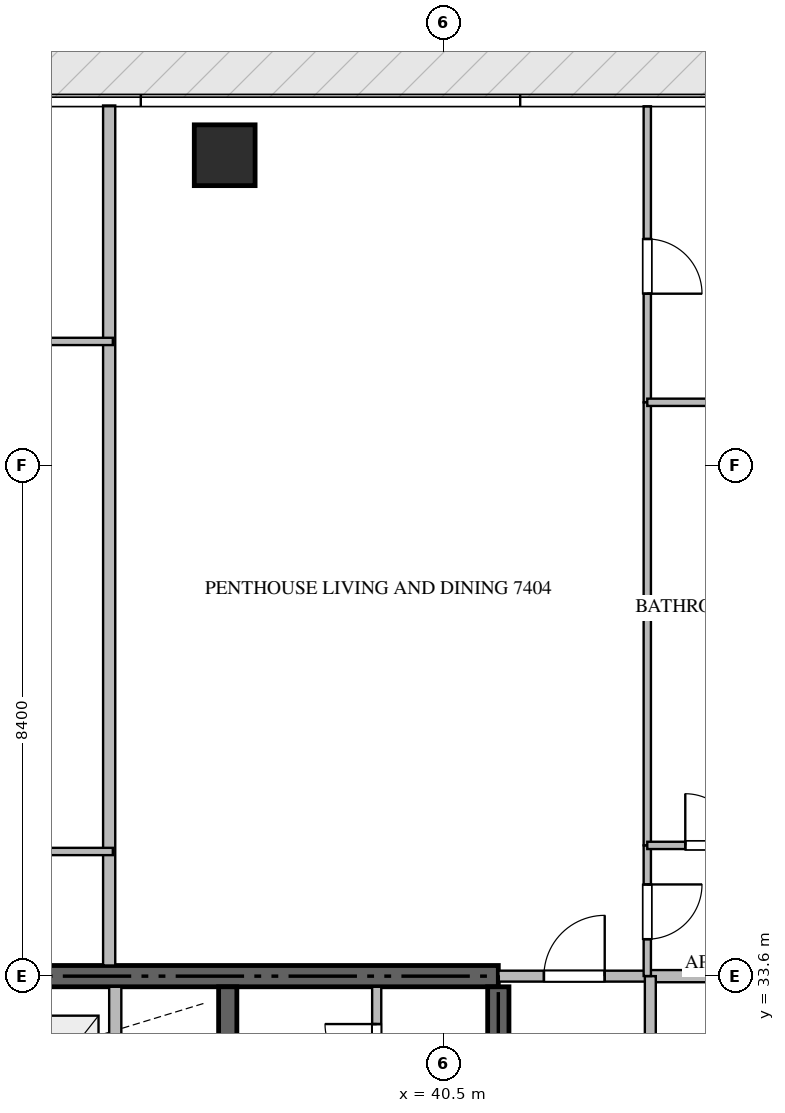
"""IFC4 building model, lengths in metres.
Left out: names, types, materials, properties, quantities, classifications, styles, units other than length and angle.
Written with IfcOpenShell. Run it as: python <this file> out.ifc"""

import sys

from ifc_helpers import new_model, si_unit, direction, frame, frame_2d, origin, origin_2d, place, context, subcontext, project, spatial, rectangle, extrude, source, transform, mapped, element, fill, save


model = new_model("IFC4")
c1 = context("Model", 3, precision=1e-05, world=origin(), true_north=direction((0.0, 1.0)))
c2 = subcontext(c1, "Body", "Model", "MODEL_VIEW")
j1 = project(units=[si_unit("LENGTHUNIT", "METRE"), si_unit("PLANEANGLEUNIT", "RADIAN")], contexts=[c1])
p1 = place(None, origin())
s1 = spatial("IfcSite", under=j1, at=p1, CompositionType="ELEMENT")
p2 = place(p1, origin())
s2 = spatial("IfcBuilding", under=s1, at=p2, CompositionType="ELEMENT")
p3 = place(p2, frame((0.0, 0.0, 297.5)))
s3 = spatial("IfcBuildingStorey", under=s2, at=p3, CompositionType="ELEMENT", Elevation=297.5)
p4 = place(p3, frame((41.4, 33.6, -0.26), z_axis=(0.0, 0.0, 1.0), x_axis=(-1.0, 0.0, 0.0)))
e1 = element("IfcWall", 1, at=p4, inside=s3, PredefinedType="SHEAR", context=c2, shape_type="SweptSolid", body=[
    extrude(rectangle(XDim=18.0, YDim=0.35, at=frame_2d((9.0, 0.0))), origin(), (0.0, 0.0, 1.0), 4.048),
])
p5 = place(p3, frame((41.4, 27.75, -0.26), z_axis=(0.0, 0.0, 1.0), x_axis=(0.0, 1.0, 0.0)))
e2 = element("IfcWall", 2, at=p5, inside=s3, PredefinedType="SHEAR", context=c2, shape_type="SweptSolid", body=[
    extrude(rectangle(XDim=5.675, YDim=0.35, at=frame_2d((2.837, 0.0))), origin(), (0.0, 0.0, 1.0), 4.048),
])
p6 = place(p3, frame((36.95, 27.05, -0.26), z_axis=(0.0, 0.0, 1.0), x_axis=(0.0, 1.0, 0.0)))
e3 = element("IfcWall", 3, at=p6, inside=s3, PredefinedType="SHEAR", context=c2, shape_type="SweptSolid", body=[
    extrude(rectangle(XDim=6.375, YDim=0.3, at=frame_2d((3.188, 0.0))), origin(), (0.0, 0.0, 1.0), 4.048),
])
m1 = source(origin(), c2, "Body", "SweptSolid", [
    extrude(rectangle(XDim=1.0, YDim=1.0, at=origin_2d()), origin(), (0.0, 0.0, 1.0), 4.05),
])
p7 = place(p3, frame((36.9, 47.1, -0.26), z_axis=(0.0, 0.0, 1.0), x_axis=(1.0, 0.0, 0.0)))
e4 = element("IfcColumn", 4, at=p7, inside=s3, PredefinedType="COLUMN", context=c2, shape_type="MappedRepresentation", body=[
    mapped(m1, transform((0.0, 0.0, 0.0), scale=1.0)),
])
p8 = place(p3, frame((35.1, 30.75, 0.0), z_axis=(0.0, 0.0, 1.0), x_axis=(0.0, 1.0, 0.0)))
e5 = element("IfcWall", 5, at=p8, inside=s3, PredefinedType="STANDARD", context=c2, shape_type="SweptSolid", body=[
    extrude(rectangle(XDim=2.675, YDim=0.2, at=frame_2d((1.337, 0.0))), origin(), (0.0, 0.0, 1.0), 3.79),
])
p9 = place(p3, frame((39.4, 31.35, 0.0), z_axis=(0.0, 0.0, 1.0), x_axis=(0.0, 1.0, 0.0)))
e6 = element("IfcWall", 6, at=p9, inside=s3, PredefinedType="PARTITIONING", context=c2, shape_type="SweptSolid", body=[
    extrude(rectangle(XDim=2.075, YDim=0.15, at=frame_2d((1.038, 0.0))), origin(), (0.0, 0.0, 1.0), 3.79),
])
p10 = place(p9, frame((0.612, 0.0, 0.0)))
e7 = element("IfcOpeningElement", 7, at=p10, cuts=e6, PredefinedType="OPENING", context=c2, shape_type="SweptSolid", body=[
    extrude(rectangle(XDim=0.85, YDim=2.1, at=frame_2d((0.425, 1.05))), frame((0.0, 0.085, 0.0), z_axis=(0.0, -1.0, 0.0), x_axis=(1.0, 0.0, 0.0)), (0.0, 0.0, 1.0), 0.17),
])
p11 = place(p3, frame((35.0, 33.775, 0.0), z_axis=(0.0, 0.0, 1.0), x_axis=(0.0, 1.0, 0.0)))
e8 = element("IfcWall", 8, at=p11, inside=s3, PredefinedType="PARTITIONING", context=c2, shape_type="SweptSolid", body=[
    extrude(rectangle(XDim=14.143, YDim=0.2, at=frame_2d((7.072, 0.0))), origin(), (0.0, 0.0, 1.0), 3.79),
])
p12 = place(p3, frame((43.9, 33.6, 0.0), z_axis=(0.0, 0.0, 1.0), x_axis=(1.0, 0.0, 0.0)))
e9 = element("IfcWall", 9, at=p12, inside=s3, PredefinedType="PARTITIONING", context=c2, shape_type="SweptSolid", body=[
    extrude(rectangle(XDim=11.618, YDim=0.2, at=frame_2d((5.809, 0.0))), origin(), (0.0, 0.0, 1.0), 3.79),
])
p13 = place(p3, frame((41.402, 33.6, 0.0), z_axis=(0.0, 0.0, 1.0), x_axis=(1.0, 0.0, 0.0)))
e10 = element("IfcWall", 10, at=p13, inside=s3, PredefinedType="PARTITIONING", context=c2, shape_type="SweptSolid", body=[
    extrude(rectangle(XDim=2.496, YDim=0.18, at=frame_2d((1.248, 0.0))), origin(), (0.0, 0.0, 1.0), 3.79),
])
p14 = place(p13, frame((0.748, 0.0, 0.0)))
e11 = element("IfcOpeningElement", 11, at=p14, cuts=e10, PredefinedType="OPENING", context=c2, shape_type="SweptSolid", body=[
    extrude(rectangle(XDim=1.0, YDim=2.15, at=frame_2d((0.5, 1.075))), frame((0.0, 0.1, 0.0), z_axis=(0.0, -1.0, 0.0), x_axis=(1.0, 0.0, 0.0)), (0.0, 0.0, 1.0), 0.2),
])
p15 = place(p3, frame((43.9, 16.8, 0.0), z_axis=(0.0, 0.0, 1.0), x_axis=(0.0, 1.0, 0.0)))
e12 = element("IfcWall", 12, at=p15, inside=s3, PredefinedType="PARTITIONING", context=c2, shape_type="SweptSolid", body=[
    extrude(rectangle(XDim=16.8, YDim=0.18, at=frame_2d((8.4, 0.0))), origin(), (0.0, 0.0, 1.0), 3.79),
])
p16 = place(p15, frame((1.3, 0.0, 0.0)))
e13 = element("IfcOpeningElement", 13, at=p16, cuts=e12, PredefinedType="OPENING", context=c2, shape_type="SweptSolid", body=[
    extrude(rectangle(XDim=1.0, YDim=2.15, at=frame_2d((0.5, 1.075))), frame((0.0, 0.1, 0.0), z_axis=(0.0, -1.0, 0.0), x_axis=(1.0, 0.0, 0.0)), (0.0, 0.0, 1.0), 0.2),
])
for number, where, z_axis, x_axis in (
    (14, (26.3, 44.038, 0.0), (0.0, 0.0, 1.0), (1.0, 0.0, 0.0)),
    (15, (26.3, 35.65, 0.0), (0.0, 0.0, 1.0), (1.0, 0.0, 0.0)),
):
    element("IfcWall", number, at=place(p3, frame(where, z_axis=z_axis, x_axis=x_axis)), inside=s3, PredefinedType="PARTITIONING", context=c2, shape_type="SweptSolid", body=[
        extrude(rectangle(XDim=8.76, YDim=0.12, at=frame_2d((4.38, 0.0))), origin(), (0.0, 0.0, 1.0), 3.79),
    ])
p17 = place(p3, frame((43.85, 35.75, 0.0), z_axis=(0.0, 0.0, 1.0), x_axis=(0.0, -1.0, 0.0)))
e16 = element("IfcWall", 16, at=p17, inside=s3, PredefinedType="PARTITIONING", context=c2, shape_type="SweptSolid", body=[
    extrude(rectangle(XDim=2.148, YDim=0.12, at=frame_2d((1.074, 0.0))), origin(), (0.0, 0.0, 1.0), 3.79),
])
p18 = place(p17, frame((0.642, 0.0, 0.0)))
e17 = element("IfcOpeningElement", 17, at=p18, cuts=e16, PredefinedType="OPENING", context=c2, shape_type="SweptSolid", body=[
    extrude(rectangle(XDim=0.9, YDim=2.1, at=frame_2d((0.45, 1.05))), frame((0.0, 0.07, 0.0), z_axis=(0.0, -1.0, 0.0), x_axis=(1.0, 0.0, 0.0)), (0.0, 0.0, 1.0), 0.14),
])
p19 = place(p3, frame((43.85, 47.905, 0.0), z_axis=(0.0, 0.0, 1.0), x_axis=(0.0, -1.0, 0.0)))
e18 = element("IfcWall", 18, at=p19, inside=s3, PredefinedType="PARTITIONING", context=c2, shape_type="SweptSolid", body=[
    extrude(rectangle(XDim=4.868, YDim=0.12, at=frame_2d((2.434, 0.0))), origin(), (0.0, 0.0, 1.0), 3.79),
])
p20 = place(p19, frame((2.182, 0.0, 0.0)))
e19 = element("IfcOpeningElement", 19, at=p20, cuts=e18, PredefinedType="OPENING", context=c2, shape_type="SweptSolid", body=[
    extrude(rectangle(XDim=0.9, YDim=2.1, at=frame_2d((0.45, 1.05))), frame((0.0, 0.07, 0.0), z_axis=(0.0, -1.0, 0.0), x_axis=(1.0, 0.0, 0.0)), (0.0, 0.0, 1.0), 0.14),
])
p21 = place(p3, frame((43.85, 43.035, 0.0), z_axis=(0.0, 0.0, 1.0), x_axis=(0.0, -1.0, 0.0)))
e20 = element("IfcWall", 20, at=p21, inside=s3, PredefinedType="PARTITIONING", context=c2, shape_type="SweptSolid", body=[
    extrude(rectangle(XDim=7.283, YDim=0.12, at=frame_2d((3.642, 0.0))), origin(), (0.0, 0.0, 1.0), 3.79),
])
p22 = place(p3, frame((43.85, 43.037, 0.0), z_axis=(0.0, 0.0, 1.0), x_axis=(1.0, 0.0, 0.0)))
e21 = element("IfcWall", 21, at=p22, inside=s3, PredefinedType="PARTITIONING", context=c2, shape_type="SweptSolid", body=[
    extrude(rectangle(XDim=4.87, YDim=0.12, at=frame_2d((2.435, 0.0))), origin(), (0.0, 0.0, 1.0), 3.79),
])
p23 = place(p3, frame((43.85, 35.75, 0.0), z_axis=(0.0, 0.0, 1.0), x_axis=(1.0, 0.0, 0.0)))
e22 = element("IfcWall", 22, at=p23, inside=s3, PredefinedType="PARTITIONING", context=c2, shape_type="SweptSolid", body=[
    extrude(rectangle(XDim=2.1, YDim=0.12, at=frame_2d((1.05, 0.0))), origin(), (0.0, 0.0, 1.0), 3.79),
])
p24 = place(p23, frame((0.625, 0.0, 0.0)))
e23 = element("IfcOpeningElement", 23, at=p24, cuts=e22, PredefinedType="OPENING", context=c2, shape_type="SweptSolid", body=[
    extrude(rectangle(XDim=0.85, YDim=2.1, at=frame_2d((0.425, 1.05))), frame((0.0, 0.07, 0.0), z_axis=(0.0, -1.0, 0.0), x_axis=(1.0, 0.0, 0.0)), (0.0, 0.0, 1.0), 0.14),
])
m2 = source(origin(), c2, "Body", "SweptSolid", [
    extrude(rectangle(XDim=0.85, YDim=2.1, at=frame_2d((0.425, 1.05))), frame((0.0, 0.025, 0.0), z_axis=(0.0, -1.0, 0.0), x_axis=(1.0, 0.0, 0.0)), (0.0, 0.0, 1.0), 0.05),
])
p25 = place(p10, origin())
e24 = element("IfcDoor", 24, at=p25, inside=s3, OperationType="SINGLE_SWING_RIGHT", PredefinedType="DOOR", context=c2, shape_type="MappedRepresentation", body=[
    mapped(m2, transform((0.0, 0.0, 0.0), scale=1.0)),
])
fill(e7, e24)
m3 = source(origin(), c2, "Body", "SweptSolid", [
    extrude(rectangle(XDim=1.0, YDim=2.15, at=frame_2d((0.5, 1.075))), frame((0.0, 0.025, 0.0), z_axis=(0.0, -1.0, 0.0), x_axis=(1.0, 0.0, 0.0)), (0.0, 0.0, 1.0), 0.05),
])
p26 = place(p14, origin())
e25 = element("IfcDoor", 25, at=p26, inside=s3, OperationType="SINGLE_SWING_RIGHT", PredefinedType="DOOR", context=c2, shape_type="MappedRepresentation", body=[
    mapped(m3, transform((0.0, 0.0, 0.0), scale=1.0)),
])
fill(e11, e25)
m4 = source(origin(), c2, "Body", "SweptSolid", [
    extrude(rectangle(XDim=0.9, YDim=2.1, at=frame_2d((0.45, 1.05))), frame((0.0, 0.025, 0.0), z_axis=(0.0, -1.0, 0.0), x_axis=(1.0, 0.0, 0.0)), (0.0, 0.0, 1.0), 0.05),
])
p27 = place(p18, origin())
e26 = element("IfcDoor", 26, at=p27, inside=s3, OperationType="SINGLE_SWING_LEFT", PredefinedType="DOOR", context=c2, shape_type="MappedRepresentation", body=[
    mapped(m4, transform((0.0, 0.0, 0.0), scale=1.0)),
])
fill(e17, e26)
p28 = place(p20, origin())
e27 = element("IfcDoor", 27, at=p28, inside=s3, OperationType="SINGLE_SWING_RIGHT", PredefinedType="DOOR", context=c2, shape_type="MappedRepresentation", body=[
    mapped(m4, transform((0.0, 0.0, 0.0), scale=1.0)),
])
fill(e19, e27)
p29 = place(p24, origin())
e28 = element("IfcDoor", 28, at=p29, inside=s3, OperationType="SINGLE_SWING_LEFT", PredefinedType="DOOR", context=c2, shape_type="MappedRepresentation", body=[
    mapped(m2, transform((0.0, 0.0, 0.0), scale=1.0)),
])
fill(e23, e28)
save(model, sys.argv[1])
